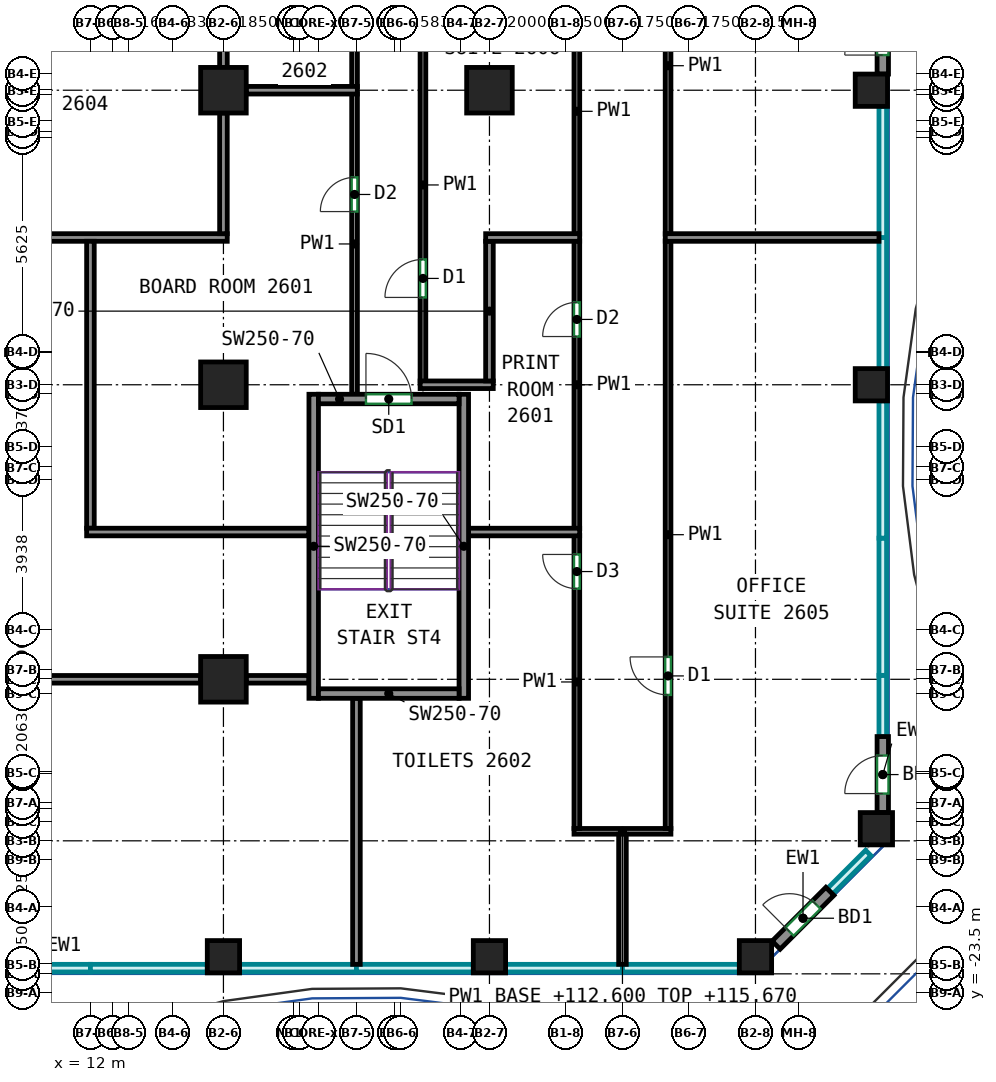
"""IFC4 building model, lengths in metres.
Left out: names, types, materials, properties, quantities, classifications, styles, units other than length and angle.
Written with IfcOpenShell. Run it as: python <this file> out.ifc"""

import sys

from ifc_helpers import new_model, si_unit, direction, frame, frame_2d, origin, origin_2d, place, context, subcontext, project, spatial, rectangle, extrude, source, transform, mapped, element, fill, save


model = new_model("IFC4")
c1 = context("Model", 3, precision=1e-05, world=origin(), true_north=direction((0.0, 1.0)))
c2 = subcontext(c1, "Body", "Model", "MODEL_VIEW")
j1 = project(units=[si_unit("LENGTHUNIT", "METRE"), si_unit("PLANEANGLEUNIT", "RADIAN")], contexts=[c1])
p1 = place(None, origin())
s1 = spatial("IfcSite", under=j1, at=p1, CompositionType="ELEMENT")
p2 = place(p1, origin())
s2 = spatial("IfcBuilding", under=s1, at=p2, CompositionType="ELEMENT")
p3 = place(p2, frame((0.0, 0.0, 112.6)))
s3 = spatial("IfcBuildingStorey", under=s2, at=p3, CompositionType="ELEMENT", Elevation=112.6)
m1 = source(origin(), c2, "Body", "SweptSolid", [
    extrude(rectangle(XDim=0.85, YDim=0.85, at=origin_2d()), origin(), (0.0, 0.0, 1.0), 3.72),
])
p4 = place(p3, frame((15.5, -22.55, 0.0), z_axis=(0.0, 0.0, 1.0), x_axis=(1.0, 0.0, 0.0)))
e1 = element("IfcColumn", 1, at=p4, inside=s3, PredefinedType="COLUMN", context=c2, shape_type="MappedRepresentation", body=[
    mapped(m1, transform((0.0, 0.0, 0.0))),
])
m2 = source(origin(), c2, "Body", "SweptSolid", [
    extrude(rectangle(XDim=1.2, YDim=1.2, at=origin_2d()), origin(), (0.0, 0.0, 1.0), 3.72),
])
for number, where, z_axis, x_axis in (
    (2, (15.5, -15.25, 0.0), (0.0, 0.0, 1.0), (1.0, 0.0, 0.0)),
    (3, (15.5, -7.5, 0.0), (0.0, 0.0, 1.0), (1.0, 0.0, 0.0)),
    (4, (15.5, 0.25, 0.0), (0.0, 0.0, 1.0), (1.0, 0.0, 0.0)),
):
    element("IfcColumn", number, at=place(p3, frame(where, z_axis=z_axis, x_axis=x_axis)), inside=s3, PredefinedType="COLUMN", context=c2, shape_type="MappedRepresentation", body=[
        mapped(m2, transform((0.0, 0.0, 0.0))),
    ])
p5 = place(p3, frame((22.5, -22.55, 0.0), z_axis=(0.0, 0.0, 1.0), x_axis=(1.0, 0.0, 0.0)))
e5 = element("IfcColumn", 5, at=p5, inside=s3, PredefinedType="COLUMN", context=c2, shape_type="MappedRepresentation", body=[
    mapped(m1, transform((0.0, 0.0, 0.0))),
])
p6 = place(p3, frame((22.5, 0.25, 0.0), z_axis=(0.0, 0.0, 1.0), x_axis=(1.0, 0.0, 0.0)))
e6 = element("IfcColumn", 6, at=p6, inside=s3, PredefinedType="COLUMN", context=c2, shape_type="MappedRepresentation", body=[
    mapped(m2, transform((0.0, 0.0, 0.0))),
])
for number, where, z_axis, x_axis in (
    (7, (29.5, -22.55, 0.0), (0.0, 0.0, 1.0), (1.0, 0.0, 0.0)),
    (8, (32.55, -7.5, 0.0), (0.0, 0.0, 1.0), (1.0, 0.0, 0.0)),
    (9, (32.55, 0.25, 0.0), (0.0, 0.0, 1.0), (1.0, 0.0, 0.0)),
    (10, (32.682, -19.182, 0.0), (0.0, 0.0, 1.0), (1.0, 0.0, 0.0)),
):
    element("IfcColumn", number, at=place(p3, frame(where, z_axis=z_axis, x_axis=x_axis)), inside=s3, PredefinedType="COLUMN", context=c2, shape_type="MappedRepresentation", body=[
        mapped(m1, transform((0.0, 0.0, 0.0))),
    ])
m3 = source(origin(), c2, "Body", "SweptSolid", [
    extrude(rectangle(XDim=8.0, YDim=0.25, at=frame_2d((4.0, 0.0))), origin(), (0.0, 0.0, 1.0), 3.72),
])
for number, where, z_axis, x_axis in (
    (11, (17.875, -15.75, 0.0), (0.0, 0.0, 1.0), (0.0, 1.0, 0.0)),
    (12, (21.825, -15.75, 0.0), (0.0, 0.0, 1.0), (0.0, 1.0, 0.0)),
):
    element("IfcWall", number, at=place(p3, frame(where, z_axis=z_axis, x_axis=x_axis)), inside=s3, PredefinedType="SHEAR", context=c2, shape_type="MappedRepresentation", body=[
        mapped(m3, transform((0.0, 0.0, 0.0))),
    ])
m4 = source(origin(), c2, "Body", "SweptSolid", [
    extrude(rectangle(XDim=3.7, YDim=0.25, at=frame_2d((1.85, 0.0))), origin(), (0.0, 0.0, 1.0), 3.72),
])
p7 = place(p3, frame((18.0, -15.625, 0.0), z_axis=(0.0, 0.0, 1.0), x_axis=(1.0, 0.0, 0.0)))
e13 = element("IfcWall", 13, at=p7, inside=s3, PredefinedType="SHEAR", context=c2, shape_type="MappedRepresentation", body=[
    mapped(m4, transform((0.0, 0.0, 0.0))),
])
p8 = place(p3, frame((18.0, -7.875, 0.0), z_axis=(0.0, 0.0, 1.0), x_axis=(1.0, 0.0, 0.0)))
e14 = element("IfcWall", 14, at=p8, inside=s3, PredefinedType="SHEAR", context=c2, shape_type="MappedRepresentation", body=[
    mapped(m4, transform((0.0, 0.0, 0.0))),
])
p9 = place(p8, frame((1.25, 0.0, 0.0)))
e15 = element("IfcOpeningElement", 15, at=p9, cuts=e14, PredefinedType="OPENING", context=c2, shape_type="SweptSolid", body=[
    extrude(rectangle(XDim=1.2, YDim=2.1, at=frame_2d((0.6, 1.05))), frame((0.0, 0.135, 0.0), z_axis=(0.0, -1.0, 0.0), x_axis=(1.0, 0.0, 0.0)), (0.0, 0.0, 1.0), 0.27),
])
m5 = source(origin(), c2, "Body", "SweptSolid", [
    extrude(rectangle(XDim=2.0, YDim=0.3, at=frame_2d((1.0, 0.0))), origin(), (0.0, 0.0, 1.0), 3.72),
])
p10 = place(p3, frame((30.044, -22.244, 0.0), z_axis=(0.0, 0.0, 1.0), x_axis=(0.707045742145, 0.70716781496, 0.0)))
e16 = element("IfcWall", 16, at=p10, inside=s3, PredefinedType="SOLIDWALL", context=c2, shape_type="MappedRepresentation", body=[
    mapped(m5, transform((0.0, 0.0, 0.0))),
])
p11 = place(p10, frame((0.5, 0.0, 0.0)))
e17 = element("IfcOpeningElement", 17, at=p11, cuts=e16, PredefinedType="OPENING", context=c2, shape_type="SweptSolid", body=[
    extrude(rectangle(XDim=1.0, YDim=2.1, at=frame_2d((0.5, 1.05))), frame((0.0, 0.16, 0.0), z_axis=(0.0, -1.0, 0.0), x_axis=(1.0, 0.0, 0.0)), (0.0, 0.0, 1.0), 0.32),
])
p12 = place(p3, frame((32.85, -18.757, 0.0), z_axis=(0.0, 0.0, 1.0), x_axis=(0.0, 1.0, 0.0)))
e18 = element("IfcWall", 18, at=p12, inside=s3, PredefinedType="SOLIDWALL", context=c2, shape_type="MappedRepresentation", body=[
    mapped(m5, transform((0.0, 0.0, 0.0))),
])
p13 = place(p12, frame((0.5, 0.0, 0.0)))
e19 = element("IfcOpeningElement", 19, at=p13, cuts=e18, PredefinedType="OPENING", context=c2, shape_type="SweptSolid", body=[
    extrude(rectangle(XDim=1.0, YDim=2.1, at=frame_2d((0.5, 1.05))), frame((0.0, 0.16, 0.0), z_axis=(0.0, -1.0, 0.0), x_axis=(1.0, 0.0, 0.0)), (0.0, 0.0, 1.0), 0.32),
])
p14 = place(p3, frame((32.85, 0.675, 0.0), z_axis=(0.0, 0.0, 1.0), x_axis=(0.0, 1.0, 0.0)))
e20 = element("IfcWall", 20, at=p14, inside=s3, PredefinedType="SOLIDWALL", context=c2, shape_type="MappedRepresentation", body=[
    mapped(m5, transform((0.0, 0.0, 0.0))),
])
p15 = place(p14, frame((0.5, 0.0, 0.0)))
e21 = element("IfcOpeningElement", 21, at=p15, cuts=e20, PredefinedType="OPENING", context=c2, shape_type="SweptSolid", body=[
    extrude(rectangle(XDim=1.0, YDim=2.1, at=frame_2d((0.5, 1.05))), frame((0.0, 0.16, 0.0), z_axis=(0.0, -1.0, 0.0), x_axis=(1.0, 0.0, 0.0)), (0.0, 0.0, 1.0), 0.32),
])
p16 = place(p3, frame((18.95, -7.75, 0.0), z_axis=(0.0, 0.0, 1.0), x_axis=(0.0, 1.0, 0.0)))
e22 = element("IfcWall", 22, at=p16, inside=s3, PredefinedType="PARTITIONING", context=c2, shape_type="SweptSolid", body=[
    extrude(rectangle(XDim=7.91, YDim=0.15, at=frame_2d((3.955, 0.0))), origin(), (0.0, 0.0, 1.0), 3.72),
])
p17 = place(p16, frame((4.807, 0.0, 0.0)))
e23 = element("IfcOpeningElement", 23, at=p17, cuts=e22, PredefinedType="OPENING", context=c2, shape_type="SweptSolid", body=[
    extrude(rectangle(XDim=0.9, YDim=2.1, at=frame_2d((0.45, 1.05))), frame((0.0, 0.085, 0.0), z_axis=(0.0, -1.0, 0.0), x_axis=(1.0, 0.0, 0.0)), (0.0, 0.0, 1.0), 0.17),
])
p18 = place(p3, frame((24.725, -19.25, 0.0), z_axis=(0.0, 0.0, 1.0), x_axis=(1.0, 0.0, 0.0)))
e24 = element("IfcWall", 24, at=p18, inside=s3, PredefinedType="PARTITIONING", context=c2, shape_type="SweptSolid", body=[
    extrude(rectangle(XDim=2.55, YDim=0.15, at=frame_2d((1.275, 0.0))), origin(), (0.0, 0.0, 1.0), 3.07),
])
p19 = place(p3, frame((24.8, -19.175, 0.0), z_axis=(0.0, 0.0, 1.0), x_axis=(0.0, 1.0, 0.0)))
e25 = element("IfcWall", 25, at=p19, inside=s3, PredefinedType="PARTITIONING", context=c2, shape_type="SweptSolid", body=[
    extrude(rectangle(XDim=7.71, YDim=0.15, at=frame_2d((3.855, 0.0))), origin(), (0.0, 0.0, 1.0), 3.72),
])
p20 = place(p19, frame((6.31, 0.0, 0.0)))
e26 = element("IfcOpeningElement", 26, at=p20, cuts=e25, PredefinedType="OPENING", context=c2, shape_type="SweptSolid", body=[
    extrude(rectangle(XDim=0.9, YDim=2.1, at=frame_2d((0.45, 1.05))), frame((0.0, 0.085, 0.0), z_axis=(0.0, -1.0, 0.0), x_axis=(1.0, 0.0, 0.0)), (0.0, 0.0, 1.0), 0.17),
])
p21 = place(p3, frame((27.2, -19.175, 0.0), z_axis=(0.0, 0.0, 1.0), x_axis=(0.0, 1.0, 0.0)))
e27 = element("IfcWall", 27, at=p21, inside=s3, PredefinedType="PARTITIONING", context=c2, shape_type="SweptSolid", body=[
    extrude(rectangle(XDim=15.46, YDim=0.15, at=frame_2d((7.73, 0.0))), origin(), (0.0, 0.0, 1.0), 3.72),
])
p22 = place(p21, frame((3.514, 0.0, 0.0)))
e28 = element("IfcOpeningElement", 28, at=p22, cuts=e27, PredefinedType="OPENING", context=c2, shape_type="SweptSolid", body=[
    extrude(rectangle(XDim=1.0, YDim=2.1, at=frame_2d((0.5, 1.05))), frame((0.0, 0.085, 0.0), z_axis=(0.0, -1.0, 0.0), x_axis=(1.0, 0.0, 0.0)), (0.0, 0.0, 1.0), 0.17),
])
p23 = place(p3, frame((24.8, -11.285, 0.0), z_axis=(0.0, 0.0, 1.0), x_axis=(0.0, 1.0, 0.0)))
e29 = element("IfcWall", 29, at=p23, inside=s3, PredefinedType="PARTITIONING", context=c2, shape_type="SweptSolid", body=[
    extrude(rectangle(XDim=7.57, YDim=0.15, at=frame_2d((3.785, 0.0))), origin(), (0.0, 0.0, 1.0), 3.72),
])
p24 = place(p23, frame((5.054, 0.0, 0.0)))
e30 = element("IfcOpeningElement", 30, at=p24, cuts=e29, PredefinedType="OPENING", context=c2, shape_type="SweptSolid", body=[
    extrude(rectangle(XDim=0.9, YDim=2.1, at=frame_2d((0.45, 1.05))), frame((0.0, 0.085, 0.0), z_axis=(0.0, -1.0, 0.0), x_axis=(1.0, 0.0, 0.0)), (0.0, 0.0, 1.0), 0.17),
])
p25 = place(p3, frame((24.8, -3.535, 0.0), z_axis=(0.0, 0.0, 1.0), x_axis=(0.0, 1.0, 0.0)))
e31 = element("IfcWall", 31, at=p25, inside=s3, PredefinedType="PARTITIONING", context=c2, shape_type="SweptSolid", body=[
    extrude(rectangle(XDim=6.46, YDim=0.15, at=frame_2d((3.23, 0.0))), origin(), (0.0, 0.0, 1.0), 3.72),
])
p26 = place(p3, frame((20.75, -7.41, 0.0), z_axis=(0.0, 0.0, 1.0), x_axis=(0.0, 1.0, 0.0)))
e32 = element("IfcWall", 32, at=p26, inside=s3, PredefinedType="PARTITIONING", context=c2, shape_type="SweptSolid", body=[
    extrude(rectangle(XDim=10.335, YDim=0.15, at=frame_2d((5.167, 0.0))), origin(), (0.0, 0.0, 1.0), 3.72),
])
p27 = place(p26, frame((2.208, 0.0, 0.0)))
e33 = element("IfcOpeningElement", 33, at=p27, cuts=e32, PredefinedType="OPENING", context=c2, shape_type="SweptSolid", body=[
    extrude(rectangle(XDim=1.0, YDim=2.1, at=frame_2d((0.5, 1.05))), frame((0.0, 0.085, 0.0), z_axis=(0.0, -1.0, 0.0), x_axis=(1.0, 0.0, 0.0)), (0.0, 0.0, 1.0), 0.17),
])
p28 = place(p3, frame((18.95, 0.34, 0.0), z_axis=(0.0, 0.0, 1.0), x_axis=(0.0, 1.0, 0.0)))
e34 = element("IfcWall", 34, at=p28, inside=s3, PredefinedType="PARTITIONING", context=c2, shape_type="SweptSolid", body=[
    extrude(rectangle(XDim=2.908, YDim=0.15, at=frame_2d((1.454, 0.0))), origin(), (0.0, 0.0, 1.0), 3.72),
])
p29 = place(p3, frame((27.2, -3.535, 0.0), z_axis=(0.0, 0.0, 1.0), x_axis=(0.0, 1.0, 0.0)))
e35 = element("IfcWall", 35, at=p29, inside=s3, PredefinedType="PARTITIONING", context=c2, shape_type="SweptSolid", body=[
    extrude(rectangle(XDim=8.86, YDim=0.15, at=frame_2d((4.43, 0.0))), origin(), (0.0, 0.0, 1.0), 3.72),
])
p30 = place(p29, frame((6.854, 0.0, 0.0)))
e36 = element("IfcOpeningElement", 36, at=p30, cuts=e35, PredefinedType="OPENING", context=c2, shape_type="SweptSolid", body=[
    extrude(rectangle(XDim=1.0, YDim=2.1, at=frame_2d((0.5, 1.05))), frame((0.0, 0.085, 0.0), z_axis=(0.0, -1.0, 0.0), x_axis=(1.0, 0.0, 0.0)), (0.0, 0.0, 1.0), 0.17),
])
p31 = place(p3, frame((-17.874, -3.625, 0.0), z_axis=(0.0, 0.0, 1.0), x_axis=(1.0, 0.0, 0.0)))
e37 = element("IfcWall", 37, at=p31, inside=s3, PredefinedType="PARTITIONING", context=c2, shape_type="SweptSolid", body=[
    extrude(rectangle(XDim=33.474, YDim=0.2, at=frame_2d((16.737, 0.0))), origin(), (0.0, 0.0, 1.0), 3.72),
])
p32 = place(p3, frame((16.1, -15.25, 0.0), z_axis=(0.0, 0.0, 1.0), x_axis=(1.0, 0.0, 0.0)))
e38 = element("IfcWall", 38, at=p32, inside=s3, PredefinedType="PARTITIONING", context=c2, shape_type="SweptSolid", body=[
    extrude(rectangle(XDim=1.65, YDim=0.2, at=frame_2d((0.825, 0.0))), origin(), (0.0, 0.0, 1.0), 3.72),
])
p33 = place(p3, frame((9.1, -15.25, 0.0), z_axis=(0.0, 0.0, 1.0), x_axis=(1.0, 0.0, 0.0)))
e39 = element("IfcWall", 39, at=p33, inside=s3, PredefinedType="PARTITIONING", context=c2, shape_type="SweptSolid", body=[
    extrude(rectangle(XDim=5.8, YDim=0.2, at=frame_2d((2.9, 0.0))), origin(), (0.0, 0.0, 1.0), 3.72),
])
p34 = place(p3, frame((12.0, -11.275, 0.0), z_axis=(0.0, 0.0, 1.0), x_axis=(0.0, 1.0, 0.0)))
e40 = element("IfcWall", 40, at=p34, inside=s3, PredefinedType="PARTITIONING", context=c2, shape_type="SweptSolid", body=[
    extrude(rectangle(XDim=7.55, YDim=0.2, at=frame_2d((3.775, 0.0))), origin(), (0.0, 0.0, 1.0), 3.72),
])
p35 = place(p3, frame((11.9, -11.375, 0.0), z_axis=(0.0, 0.0, 1.0), x_axis=(1.0, 0.0, 0.0)))
e41 = element("IfcWall", 41, at=p35, inside=s3, PredefinedType="PARTITIONING", context=c2, shape_type="SweptSolid", body=[
    extrude(rectangle(XDim=5.85, YDim=0.2, at=frame_2d((2.925, 0.0))), origin(), (0.0, 0.0, 1.0), 3.72),
])
p36 = place(p3, frame((19.0, -22.75, 0.0), z_axis=(0.0, 0.0, 1.0), x_axis=(0.0, 1.0, 0.0)))
e42 = element("IfcWall", 42, at=p36, inside=s3, PredefinedType="PARTITIONING", context=c2, shape_type="SweptSolid", body=[
    extrude(rectangle(XDim=7.0, YDim=0.2, at=frame_2d((3.5, 0.0))), origin(), (0.0, 0.0, 1.0), 3.72),
])
p37 = place(p3, frame((15.5, -3.525, 0.0), z_axis=(0.0, 0.0, 1.0), x_axis=(0.0, 1.0, 0.0)))
e43 = element("IfcWall", 43, at=p37, inside=s3, PredefinedType="PARTITIONING", context=c2, shape_type="SweptSolid", body=[
    extrude(rectangle(XDim=3.175, YDim=0.2, at=frame_2d((1.587, 0.0))), origin(), (0.0, 0.0, 1.0), 3.72),
])
p38 = place(p3, frame((15.5, 0.85, 0.0), z_axis=(0.0, 0.0, 1.0), x_axis=(0.0, 1.0, 0.0)))
e44 = element("IfcWall", 44, at=p38, inside=s3, PredefinedType="PARTITIONING", context=c2, shape_type="SweptSolid", body=[
    extrude(rectangle(XDim=2.024, YDim=0.2, at=frame_2d((1.012, 0.0))), origin(), (0.0, 0.0, 1.0), 3.72),
])
p39 = place(p3, frame((16.1, 0.25, 0.0), z_axis=(0.0, 0.0, 1.0), x_axis=(1.0, 0.0, 0.0)))
e45 = element("IfcWall", 45, at=p39, inside=s3, PredefinedType="PARTITIONING", context=c2, shape_type="SweptSolid", body=[
    extrude(rectangle(XDim=2.924, YDim=0.2, at=frame_2d((1.462, 0.0))), origin(), (0.0, 0.0, 1.0), 3.72),
])
p40 = place(p3, frame((26.0, -22.75, 0.0), z_axis=(0.0, 0.0, 1.0), x_axis=(0.0, 1.0, 0.0)))
e46 = element("IfcWall", 46, at=p40, inside=s3, PredefinedType="PARTITIONING", context=c2, shape_type="SweptSolid", body=[
    extrude(rectangle(XDim=3.424, YDim=0.2, at=frame_2d((1.712, 0.0))), origin(), (0.0, 0.0, 1.0), 3.72),
])
p41 = place(p3, frame((21.95, -11.375, 0.0), z_axis=(0.0, 0.0, 1.0), x_axis=(1.0, 0.0, 0.0)))
e47 = element("IfcWall", 47, at=p41, inside=s3, PredefinedType="PARTITIONING", context=c2, shape_type="SweptSolid", body=[
    extrude(rectangle(XDim=2.924, YDim=0.2, at=frame_2d((1.462, 0.0))), origin(), (0.0, 0.0, 1.0), 3.72),
])
p42 = place(p3, frame((27.126, -3.625, 0.0), z_axis=(0.0, 0.0, 1.0), x_axis=(1.0, 0.0, 0.0)))
e48 = element("IfcWall", 48, at=p42, inside=s3, PredefinedType="PARTITIONING", context=c2, shape_type="SweptSolid", body=[
    extrude(rectangle(XDim=5.624, YDim=0.2, at=frame_2d((2.812, 0.0))), origin(), (0.0, 0.0, 1.0), 3.72),
])
p43 = place(p3, frame((22.6, -7.5, 0.0), z_axis=(0.0, 0.0, 1.0), x_axis=(-1.0, 0.0, 0.0)))
e49 = element("IfcWall", 49, at=p43, inside=s3, PredefinedType="PARTITIONING", context=c2, shape_type="SweptSolid", body=[
    extrude(rectangle(XDim=1.924, YDim=0.2, at=frame_2d((0.962, 0.0))), origin(), (0.0, 0.0, 1.0), 3.72),
])
p44 = place(p3, frame((22.5, -3.725, 0.0), z_axis=(0.0, 0.0, 1.0), x_axis=(0.0, -1.0, 0.0)))
e50 = element("IfcWall", 50, at=p44, inside=s3, PredefinedType="PARTITIONING", context=c2, shape_type="SweptSolid", body=[
    extrude(rectangle(XDim=3.675, YDim=0.2, at=frame_2d((1.837, 0.0))), origin(), (0.0, 0.0, 1.0), 3.07),
])
p45 = place(p3, frame((22.4, -3.625, 0.0), z_axis=(0.0, 0.0, 1.0), x_axis=(1.0, 0.0, 0.0)))
e51 = element("IfcWall", 51, at=p45, inside=s3, PredefinedType="PARTITIONING", context=c2, shape_type="SweptSolid", body=[
    extrude(rectangle(XDim=2.474, YDim=0.2, at=frame_2d((1.237, 0.0))), origin(), (0.0, 0.0, 1.0), 3.72),
])
p46 = place(p11, origin())
e52 = element("IfcDoor", 52, at=p46, inside=s3, OperationType="SINGLE_SWING_LEFT", PredefinedType="DOOR", context=c2, shape_type="SweptSolid", body=[
    extrude(rectangle(XDim=1.0, YDim=2.1, at=frame_2d((0.5, 1.05))), frame((0.0, 0.025, 0.0), z_axis=(0.0, -1.0, 0.0), x_axis=(1.0, 0.0, 0.0)), (0.0, 0.0, 1.0), 0.05),
])
fill(e17, e52)
p47 = place(p13, origin())
e53 = element("IfcDoor", 53, at=p47, inside=s3, OperationType="SINGLE_SWING_LEFT", PredefinedType="DOOR", context=c2, shape_type="SweptSolid", body=[
    extrude(rectangle(XDim=1.0, YDim=2.1, at=frame_2d((0.5, 1.05))), frame((0.0, 0.025, 0.0), z_axis=(0.0, -1.0, 0.0), x_axis=(1.0, 0.0, 0.0)), (0.0, 0.0, 1.0), 0.05),
])
fill(e19, e53)
p48 = place(p15, origin())
e54 = element("IfcDoor", 54, at=p48, inside=s3, OperationType="SINGLE_SWING_LEFT", PredefinedType="DOOR", context=c2, shape_type="SweptSolid", body=[
    extrude(rectangle(XDim=1.0, YDim=2.1, at=frame_2d((0.5, 1.05))), frame((0.0, 0.025, 0.0), z_axis=(0.0, -1.0, 0.0), x_axis=(1.0, 0.0, 0.0)), (0.0, 0.0, 1.0), 0.05),
])
fill(e21, e54)
p49 = place(p9, origin())
e55 = element("IfcDoor", 55, at=p49, inside=s3, OperationType="DOUBLE_DOOR_SINGLE_SWING", PredefinedType="DOOR", context=c2, shape_type="SweptSolid", body=[
    extrude(rectangle(XDim=1.2, YDim=2.1, at=frame_2d((0.6, 1.05))), frame((0.0, 0.025, 0.0), z_axis=(0.0, -1.0, 0.0), x_axis=(1.0, 0.0, 0.0)), (0.0, 0.0, 1.0), 0.05),
])
fill(e15, e55)
p50 = place(p22, origin())
e56 = element("IfcDoor", 56, at=p50, inside=s3, OperationType="SINGLE_SWING_RIGHT", PredefinedType="DOOR", context=c2, shape_type="SweptSolid", body=[
    extrude(rectangle(XDim=1.0, YDim=2.1, at=frame_2d((0.5, 1.05))), frame((0.0, 0.025, 0.0), z_axis=(0.0, -1.0, 0.0), x_axis=(1.0, 0.0, 0.0)), (0.0, 0.0, 1.0), 0.05),
])
fill(e28, e56)
p51 = place(p20, origin())
e57 = element("IfcDoor", 57, at=p51, inside=s3, OperationType="SINGLE_SWING_RIGHT", PredefinedType="DOOR", context=c2, shape_type="SweptSolid", body=[
    extrude(rectangle(XDim=0.9, YDim=2.1, at=frame_2d((0.45, 1.05))), frame((0.0, 0.025, 0.0), z_axis=(0.0, -1.0, 0.0), x_axis=(1.0, 0.0, 0.0)), (0.0, 0.0, 1.0), 0.05),
])
fill(e26, e57)
p52 = place(p24, origin())
e58 = element("IfcDoor", 58, at=p52, inside=s3, OperationType="SINGLE_SWING_LEFT", PredefinedType="DOOR", context=c2, shape_type="SweptSolid", body=[
    extrude(rectangle(XDim=0.9, YDim=2.1, at=frame_2d((0.45, 1.05))), frame((0.0, 0.025, 0.0), z_axis=(0.0, -1.0, 0.0), x_axis=(1.0, 0.0, 0.0)), (0.0, 0.0, 1.0), 0.05),
])
fill(e30, e58)
p53 = place(p27, origin())
e59 = element("IfcDoor", 59, at=p53, inside=s3, OperationType="SINGLE_SWING_LEFT", PredefinedType="DOOR", context=c2, shape_type="SweptSolid", body=[
    extrude(rectangle(XDim=1.0, YDim=2.1, at=frame_2d((0.5, 1.05))), frame((0.0, 0.025, 0.0), z_axis=(0.0, -1.0, 0.0), x_axis=(1.0, 0.0, 0.0)), (0.0, 0.0, 1.0), 0.05),
])
fill(e33, e59)
p54 = place(p17, origin())
e60 = element("IfcDoor", 60, at=p54, inside=s3, OperationType="SINGLE_SWING_LEFT", PredefinedType="DOOR", context=c2, shape_type="SweptSolid", body=[
    extrude(rectangle(XDim=0.9, YDim=2.1, at=frame_2d((0.45, 1.05))), frame((0.0, 0.025, 0.0), z_axis=(0.0, -1.0, 0.0), x_axis=(1.0, 0.0, 0.0)), (0.0, 0.0, 1.0), 0.05),
])
fill(e23, e60)
save(model, sys.argv[1])
